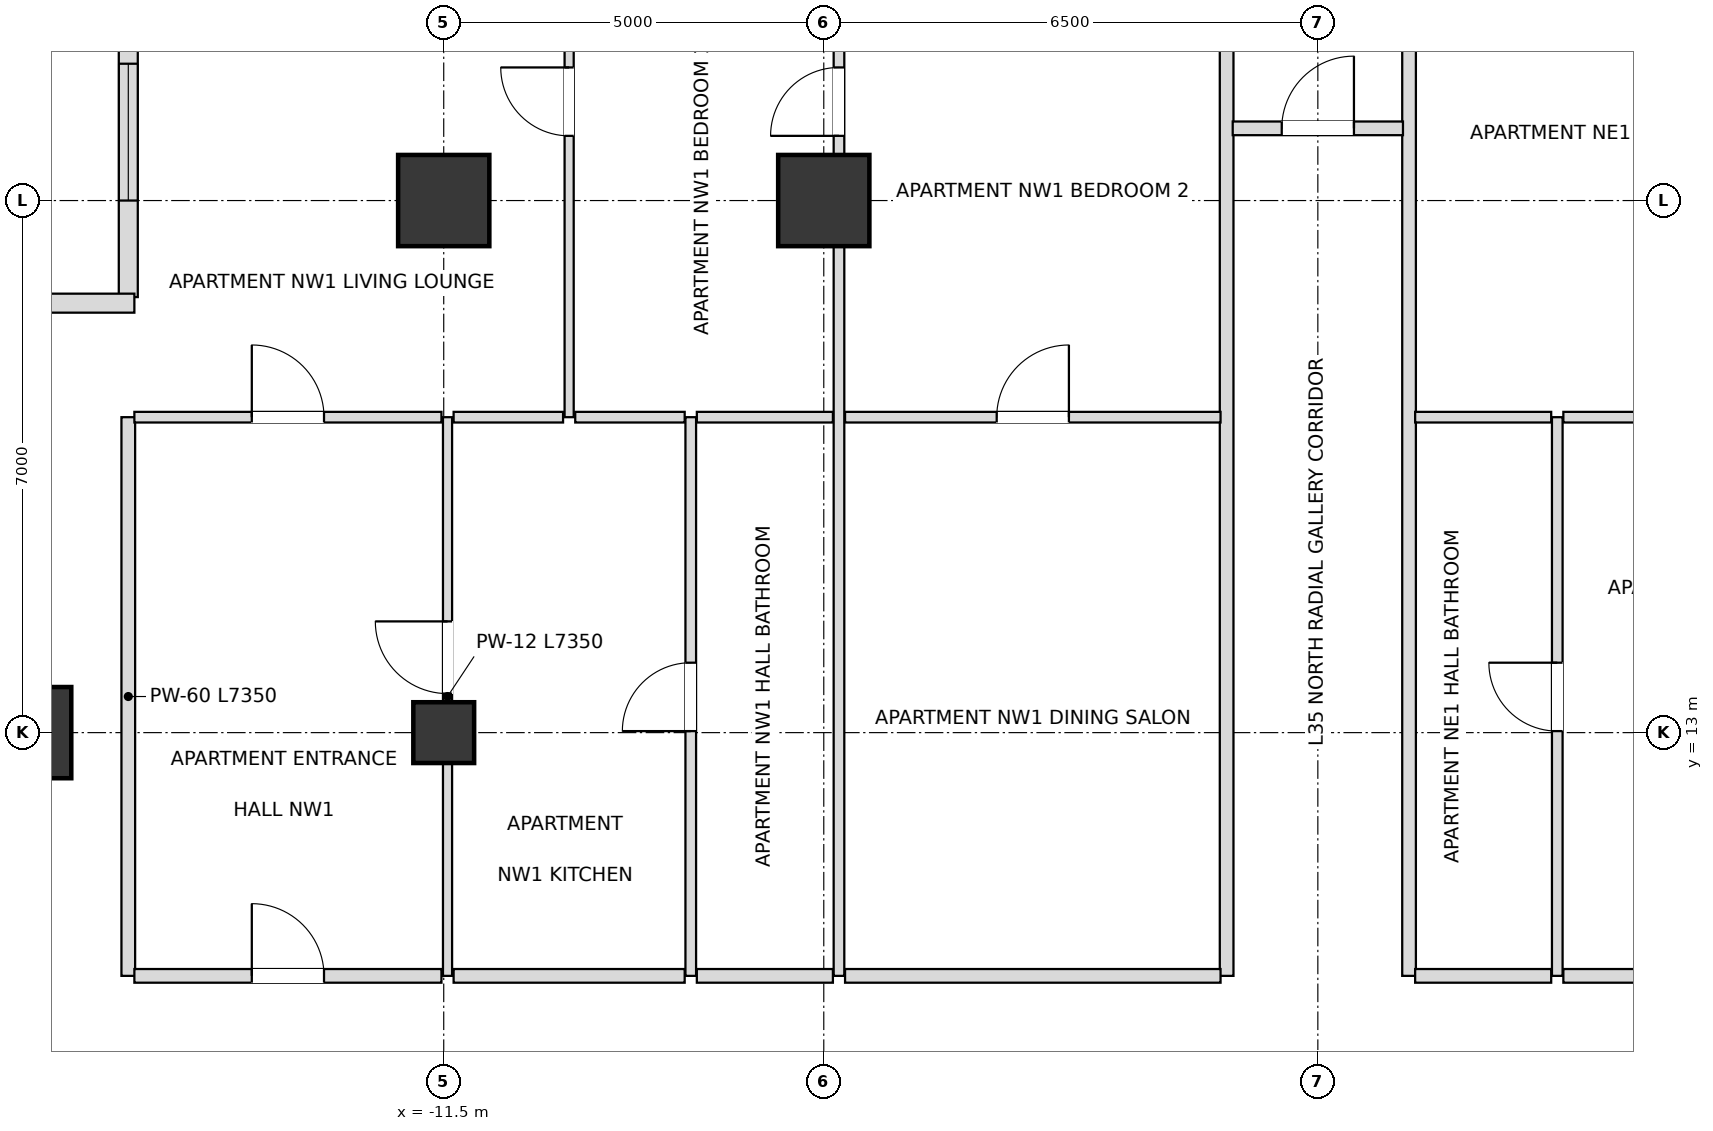
"""IFC4 building model, lengths in metres.
Left out: names, types, materials, properties, quantities, classifications, styles, units other than length and angle.
Written with IfcOpenShell. Run it as: python <this file> out.ifc"""

import sys

from ifc_helpers import new_model, si_unit, direction, frame, frame_2d, origin, origin_2d, place, context, subcontext, project, spatial, rectangle, extrude, element, fill, save


model = new_model("IFC4")
c1 = context("Model", 3, precision=1e-05, world=origin(), true_north=direction((0.0, 1.0)))
c2 = subcontext(c1, "Body", "Model", "MODEL_VIEW")
j1 = project(units=[si_unit("LENGTHUNIT", "METRE"), si_unit("PLANEANGLEUNIT", "RADIAN")], contexts=[c1])
p1 = place(None, origin())
s1 = spatial("IfcSite", under=j1, at=p1, CompositionType="ELEMENT")
p2 = place(p1, origin())
s2 = spatial("IfcBuilding", under=s1, at=p2, CompositionType="ELEMENT")
p3 = place(p2, frame((0.0, 0.0, 140.4)))
s3 = spatial("IfcBuildingStorey", under=s2, at=p3, CompositionType="ELEMENT", Elevation=140.4)
for number, where, z_axis, x_axis in (
    (1, (-6.5, 20.0, 0.0), (0.0, 0.0, 1.0), (1.0, 0.0, 0.0)),
    (2, (-11.5, 20.0, 0.0), (0.0, 0.0, 1.0), (1.0, 0.0, 0.0)),
    (3, (-17.0, 13.0, 0.0), (0.0, 0.0, 1.0), (1.0, 0.0, 0.0)),
):
    element("IfcColumn", number, at=place(p3, frame(where, z_axis=z_axis, x_axis=x_axis)), inside=s3, PredefinedType="USERDEFINED", context=c2, shape_type="SweptSolid", body=[
        extrude(rectangle(XDim=1.2, YDim=1.2, at=origin_2d()), origin(), (0.0, 0.0, 1.0), 3.6),
    ])
p4 = place(p3, frame((-11.5, 13.0, 0.0), z_axis=(0.0, 0.0, 1.0), x_axis=(1.0, 0.0, 0.0)))
e4 = element("IfcColumn", 4, at=p4, inside=s3, PredefinedType="COLUMN", context=c2, shape_type="SweptSolid", body=[
    extrude(rectangle(XDim=0.8, YDim=0.8, at=origin_2d()), origin(), (0.0, 0.0, 1.0), 3.6),
])
p5 = place(p3, frame((-15.65, 23.07, 0.0), z_axis=(0.0, 0.0, 1.0), x_axis=(0.0, -1.0, 0.0)))
e5 = element("IfcWall", 5, at=p5, inside=s3, PredefinedType="SOLIDWALL", context=c2, shape_type="SweptSolid", body=[
    extrude(rectangle(XDim=4.34, YDim=0.25, at=frame_2d((2.17, 0.0))), origin(), (0.0, 0.0, 1.0), 2.736),
])
p6 = place(p5, frame((1.27, 0.0, 0.72)))
e6 = element("IfcOpeningElement", 6, at=p6, cuts=e5, PredefinedType="OPENING", context=c2, shape_type="SweptSolid", body=[
    extrude(rectangle(XDim=1.8, YDim=1.68, at=frame_2d((0.9, 0.84))), frame((0.0, 0.135, 0.0), z_axis=(0.0, -1.0, 0.0), x_axis=(1.0, 0.0, 0.0)), (0.0, 0.0, 1.0), 0.27),
])
p7 = place(p3, frame((-15.57, 18.65, 0.0), z_axis=(0.0, 0.0, 1.0), x_axis=(-1.0, 0.0, 0.0)))
e7 = element("IfcWall", 7, at=p7, inside=s3, PredefinedType="SOLIDWALL", context=c2, shape_type="SweptSolid", body=[
    extrude(rectangle(XDim=4.66, YDim=0.25, at=frame_2d((2.33, 0.0))), origin(), (0.0, 0.0, 1.0), 2.736),
])
p8 = place(p7, frame((1.43, 0.0, 0.72)))
e8 = element("IfcOpeningElement", 8, at=p8, cuts=e7, PredefinedType="OPENING", context=c2, shape_type="SweptSolid", body=[
    extrude(rectangle(XDim=1.8, YDim=1.68, at=frame_2d((0.9, 0.84))), frame((0.0, 0.135, 0.0), z_axis=(0.0, -1.0, 0.0), x_axis=(1.0, 0.0, 0.0)), (0.0, 0.0, 1.0), 0.27),
])
p9 = place(p3, frame((-15.65, 9.8, 0.0), z_axis=(0.0, 0.0, 1.0), x_axis=(0.0, 1.0, 0.0)))
e9 = element("IfcWall", 9, at=p9, inside=s3, PredefinedType="PARTITIONING", context=c2, shape_type="SweptSolid", body=[
    extrude(rectangle(XDim=7.35, YDim=0.18, at=frame_2d((3.675, 0.0))), origin(), (0.0, 0.0, 1.0), 2.736),
])
p10 = place(p3, frame((-11.45, 9.8, 0.0), z_axis=(0.0, 0.0, 1.0), x_axis=(0.0, 1.0, 0.0)))
e10 = element("IfcWall", 10, at=p10, inside=s3, PredefinedType="PARTITIONING", context=c2, shape_type="SweptSolid", body=[
    extrude(rectangle(XDim=7.35, YDim=0.12, at=frame_2d((3.675, 0.0))), origin(), (0.0, 0.0, 1.0), 2.736),
])
p11 = place(p10, frame((3.713, 0.0, 0.0)))
e11 = element("IfcOpeningElement", 11, at=p11, cuts=e10, PredefinedType="OPENING", context=c2, shape_type="SweptSolid", body=[
    extrude(rectangle(XDim=0.95, YDim=2.1, at=frame_2d((0.475, 1.05))), frame((0.0, 0.07, 0.0), z_axis=(0.0, -1.0, 0.0), x_axis=(1.0, 0.0, 0.0)), (0.0, 0.0, 1.0), 0.14),
])
p12 = place(p3, frame((-9.85, 17.15, 0.0), z_axis=(0.0, 0.0, 1.0), x_axis=(0.0, 1.0, 0.0)))
e12 = element("IfcWall", 12, at=p12, inside=s3, PredefinedType="PARTITIONING", context=c2, shape_type="SweptSolid", body=[
    extrude(rectangle(XDim=6.0, YDim=0.12, at=frame_2d((3.0, 0.0))), origin(), (0.0, 0.0, 1.0), 2.816),
])
p13 = place(p12, frame((3.701, 0.0, 0.0)))
e13 = element("IfcOpeningElement", 13, at=p13, cuts=e12, PredefinedType="OPENING", context=c2, shape_type="SweptSolid", body=[
    extrude(rectangle(XDim=0.9, YDim=2.1, at=frame_2d((0.45, 1.05))), frame((0.0, 0.07, 0.0), z_axis=(0.0, -1.0, 0.0), x_axis=(1.0, 0.0, 0.0)), (0.0, 0.0, 1.0), 0.14),
])
p14 = place(p3, frame((-8.25, 9.8, 0.0), z_axis=(0.0, 0.0, 1.0), x_axis=(0.0, 1.0, 0.0)))
e14 = element("IfcWall", 14, at=p14, inside=s3, PredefinedType="PARTITIONING", context=c2, shape_type="SweptSolid", body=[
    extrude(rectangle(XDim=7.35, YDim=0.14, at=frame_2d((3.675, 0.0))), origin(), (0.0, 0.0, 1.0), 2.816),
])
p15 = place(p14, frame((3.22, 0.0, 0.0)))
e15 = element("IfcOpeningElement", 15, at=p15, cuts=e14, PredefinedType="OPENING", context=c2, shape_type="SweptSolid", body=[
    extrude(rectangle(XDim=0.9, YDim=2.1, at=frame_2d((0.45, 1.05))), frame((0.0, 0.08, 0.0), z_axis=(0.0, -1.0, 0.0), x_axis=(1.0, 0.0, 0.0)), (0.0, 0.0, 1.0), 0.16),
])
p16 = place(p3, frame((-6.3, 9.8, 0.0), z_axis=(0.0, 0.0, 1.0), x_axis=(0.0, 1.0, 0.0)))
e16 = element("IfcWall", 16, at=p16, inside=s3, PredefinedType="PARTITIONING", context=c2, shape_type="SweptSolid", body=[
    extrude(rectangle(XDim=13.35, YDim=0.14, at=frame_2d((6.675, 0.0))), origin(), (0.0, 0.0, 1.0), 2.816),
])
p17 = place(p16, frame((11.051, 0.0, 0.0)))
e17 = element("IfcOpeningElement", 17, at=p17, cuts=e16, PredefinedType="OPENING", context=c2, shape_type="SweptSolid", body=[
    extrude(rectangle(XDim=0.9, YDim=2.1, at=frame_2d((0.45, 1.05))), frame((0.0, 0.08, 0.0), z_axis=(0.0, -1.0, 0.0), x_axis=(1.0, 0.0, 0.0)), (0.0, 0.0, 1.0), 0.16),
])
for number, where, z_axis, x_axis in (
    (18, (-1.2, 9.8, 0.0), (0.0, 0.0, 1.0), (0.0, 1.0, 0.0)),
    (19, (1.2, 9.8, 0.0), (0.0, 0.0, 1.0), (0.0, 1.0, 0.0)),
):
    element("IfcWall", number, at=place(p3, frame(where, z_axis=z_axis, x_axis=x_axis)), inside=s3, PredefinedType="PARTITIONING", context=c2, shape_type="SweptSolid", body=[
        extrude(rectangle(XDim=13.35, YDim=0.18, at=frame_2d((6.675, 0.0))), origin(), (0.0, 0.0, 1.0), 2.816),
    ])
p18 = place(p3, frame((3.15, 9.8, 0.0), z_axis=(0.0, 0.0, 1.0), x_axis=(0.0, 1.0, 0.0)))
e20 = element("IfcWall", 20, at=p18, inside=s3, PredefinedType="PARTITIONING", context=c2, shape_type="SweptSolid", body=[
    extrude(rectangle(XDim=7.35, YDim=0.14, at=frame_2d((3.675, 0.0))), origin(), (0.0, 0.0, 1.0), 3.38),
])
p19 = place(p18, frame((3.22, 0.0, 0.0)))
e21 = element("IfcOpeningElement", 21, at=p19, cuts=e20, PredefinedType="OPENING", context=c2, shape_type="SweptSolid", body=[
    extrude(rectangle(XDim=0.9, YDim=2.1, at=frame_2d((0.45, 1.05))), frame((0.0, 0.08, 0.0), z_axis=(0.0, -1.0, 0.0), x_axis=(1.0, 0.0, 0.0)), (0.0, 0.0, 1.0), 0.16),
])
p20 = place(p3, frame((-15.57, 9.8, 0.0), z_axis=(0.0, 0.0, 1.0), x_axis=(1.0, 0.0, 0.0)))
e22 = element("IfcWall", 22, at=p20, inside=s3, PredefinedType="PARTITIONING", context=c2, shape_type="SweptSolid", body=[
    extrude(rectangle(XDim=4.04, YDim=0.18, at=frame_2d((2.02, 0.0))), origin(), (0.0, 0.0, 1.0), 3.38),
])
p21 = place(p20, frame((1.545, 0.0, 0.0)))
e23 = element("IfcOpeningElement", 23, at=p21, cuts=e22, PredefinedType="OPENING", context=c2, shape_type="SweptSolid", body=[
    extrude(rectangle(XDim=0.95, YDim=2.15, at=frame_2d((0.475, 1.075))), frame((0.0, 0.1, 0.0), z_axis=(0.0, -1.0, 0.0), x_axis=(1.0, 0.0, 0.0)), (0.0, 0.0, 1.0), 0.2),
])
p22 = place(p3, frame((-11.37, 9.8, 0.0), z_axis=(0.0, 0.0, 1.0), x_axis=(1.0, 0.0, 0.0)))
e24 = element("IfcWall", 24, at=p22, inside=s3, PredefinedType="PARTITIONING", context=c2, shape_type="SweptSolid", body=[
    extrude(rectangle(XDim=3.04, YDim=0.18, at=frame_2d((1.52, 0.0))), origin(), (0.0, 0.0, 1.0), 3.38),
])
p23 = place(p3, frame((-8.17, 9.8, 0.0), z_axis=(0.0, 0.0, 1.0), x_axis=(1.0, 0.0, 0.0)))
e25 = element("IfcWall", 25, at=p23, inside=s3, PredefinedType="PARTITIONING", context=c2, shape_type="SweptSolid", body=[
    extrude(rectangle(XDim=1.79, YDim=0.18, at=frame_2d((0.895, 0.0))), origin(), (0.0, 0.0, 1.0), 2.816),
])
p24 = place(p3, frame((-6.22, 9.8, 0.0), z_axis=(0.0, 0.0, 1.0), x_axis=(1.0, 0.0, 0.0)))
e26 = element("IfcWall", 26, at=p24, inside=s3, PredefinedType="PARTITIONING", context=c2, shape_type="SweptSolid", body=[
    extrude(rectangle(XDim=4.94, YDim=0.18, at=frame_2d((2.47, 0.0))), origin(), (0.0, 0.0, 1.0), 3.38),
])
p25 = place(p3, frame((1.28, 9.8, 0.0), z_axis=(0.0, 0.0, 1.0), x_axis=(1.0, 0.0, 0.0)))
e27 = element("IfcWall", 27, at=p25, inside=s3, PredefinedType="PARTITIONING", context=c2, shape_type="SweptSolid", body=[
    extrude(rectangle(XDim=1.79, YDim=0.18, at=frame_2d((0.895, 0.0))), origin(), (0.0, 0.0, 1.0), 3.38),
])
p26 = place(p3, frame((3.23, 9.8, 0.0), z_axis=(0.0, 0.0, 1.0), x_axis=(1.0, 0.0, 0.0)))
e28 = element("IfcWall", 28, at=p26, inside=s3, PredefinedType="PARTITIONING", context=c2, shape_type="SweptSolid", body=[
    extrude(rectangle(XDim=4.04, YDim=0.18, at=frame_2d((2.02, 0.0))), origin(), (0.0, 0.0, 1.0), 2.816),
])
p27 = place(p26, frame((1.545, 0.0, 0.0)))
e29 = element("IfcOpeningElement", 29, at=p27, cuts=e28, PredefinedType="OPENING", context=c2, shape_type="SweptSolid", body=[
    extrude(rectangle(XDim=0.95, YDim=2.15, at=frame_2d((0.475, 1.075))), frame((0.0, 0.1, 0.0), z_axis=(0.0, -1.0, 0.0), x_axis=(1.0, 0.0, 0.0)), (0.0, 0.0, 1.0), 0.2),
])
p28 = place(p3, frame((-15.57, 17.15, 0.0), z_axis=(0.0, 0.0, 1.0), x_axis=(1.0, 0.0, 0.0)))
e30 = element("IfcWall", 30, at=p28, inside=s3, PredefinedType="PARTITIONING", context=c2, shape_type="SweptSolid", body=[
    extrude(rectangle(XDim=4.04, YDim=0.14, at=frame_2d((2.02, 0.0))), origin(), (0.0, 0.0, 1.0), 2.736),
])
p29 = place(p28, frame((1.545, 0.0, 0.0)))
e31 = element("IfcOpeningElement", 31, at=p29, cuts=e30, PredefinedType="OPENING", context=c2, shape_type="SweptSolid", body=[
    extrude(rectangle(XDim=0.95, YDim=2.1, at=frame_2d((0.475, 1.05))), frame((0.0, 0.08, 0.0), z_axis=(0.0, -1.0, 0.0), x_axis=(1.0, 0.0, 0.0)), (0.0, 0.0, 1.0), 0.16),
])
p30 = place(p3, frame((-11.37, 17.15, 0.0), z_axis=(0.0, 0.0, 1.0), x_axis=(1.0, 0.0, 0.0)))
e32 = element("IfcWall", 32, at=p30, inside=s3, PredefinedType="PARTITIONING", context=c2, shape_type="SweptSolid", body=[
    extrude(rectangle(XDim=1.44, YDim=0.14, at=frame_2d((0.72, 0.0))), origin(), (0.0, 0.0, 1.0), 3.38),
])
p31 = place(p3, frame((-9.77, 17.15, 0.0), z_axis=(0.0, 0.0, 1.0), x_axis=(1.0, 0.0, 0.0)))
e33 = element("IfcWall", 33, at=p31, inside=s3, PredefinedType="PARTITIONING", context=c2, shape_type="SweptSolid", body=[
    extrude(rectangle(XDim=1.44, YDim=0.14, at=frame_2d((0.72, 0.0))), origin(), (0.0, 0.0, 1.0), 3.38),
])
p32 = place(p3, frame((-8.17, 17.15, 0.0), z_axis=(0.0, 0.0, 1.0), x_axis=(1.0, 0.0, 0.0)))
e34 = element("IfcWall", 34, at=p32, inside=s3, PredefinedType="PARTITIONING", context=c2, shape_type="SweptSolid", body=[
    extrude(rectangle(XDim=1.79, YDim=0.14, at=frame_2d((0.895, 0.0))), origin(), (0.0, 0.0, 1.0), 2.816),
])
p33 = place(p3, frame((-6.22, 17.15, 0.0), z_axis=(0.0, 0.0, 1.0), x_axis=(1.0, 0.0, 0.0)))
e35 = element("IfcWall", 35, at=p33, inside=s3, PredefinedType="PARTITIONING", context=c2, shape_type="SweptSolid", body=[
    extrude(rectangle(XDim=4.94, YDim=0.14, at=frame_2d((2.47, 0.0))), origin(), (0.0, 0.0, 1.0), 3.38),
])
p34 = place(p33, frame((1.995, 0.0, 0.0)))
e36 = element("IfcOpeningElement", 36, at=p34, cuts=e35, PredefinedType="OPENING", context=c2, shape_type="SweptSolid", body=[
    extrude(rectangle(XDim=0.95, YDim=2.1, at=frame_2d((0.475, 1.05))), frame((0.0, 0.08, 0.0), z_axis=(0.0, -1.0, 0.0), x_axis=(1.0, 0.0, 0.0)), (0.0, 0.0, 1.0), 0.16),
])
p35 = place(p3, frame((1.28, 17.15, 0.0), z_axis=(0.0, 0.0, 1.0), x_axis=(1.0, 0.0, 0.0)))
e37 = element("IfcWall", 37, at=p35, inside=s3, PredefinedType="PARTITIONING", context=c2, shape_type="SweptSolid", body=[
    extrude(rectangle(XDim=1.79, YDim=0.14, at=frame_2d((0.895, 0.0))), origin(), (0.0, 0.0, 1.0), 3.38),
])
p36 = place(p3, frame((3.23, 17.15, 0.0), z_axis=(0.0, 0.0, 1.0), x_axis=(1.0, 0.0, 0.0)))
e38 = element("IfcWall", 38, at=p36, inside=s3, PredefinedType="PARTITIONING", context=c2, shape_type="SweptSolid", body=[
    extrude(rectangle(XDim=4.04, YDim=0.14, at=frame_2d((2.02, 0.0))), origin(), (0.0, 0.0, 1.0), 2.816),
])
p37 = place(p36, frame((1.545, 0.0, 0.0)))
e39 = element("IfcOpeningElement", 39, at=p37, cuts=e38, PredefinedType="OPENING", context=c2, shape_type="SweptSolid", body=[
    extrude(rectangle(XDim=0.95, YDim=2.1, at=frame_2d((0.475, 1.05))), frame((0.0, 0.08, 0.0), z_axis=(0.0, -1.0, 0.0), x_axis=(1.0, 0.0, 0.0)), (0.0, 0.0, 1.0), 0.16),
])
p38 = place(p3, frame((-1.12, 20.95, 0.0), z_axis=(0.0, 0.0, 1.0), x_axis=(1.0, 0.0, 0.0)))
e40 = element("IfcWall", 40, at=p38, inside=s3, PredefinedType="PARTITIONING", context=c2, shape_type="SweptSolid", body=[
    extrude(rectangle(XDim=2.24, YDim=0.18, at=frame_2d((1.12, 0.0))), origin(), (0.0, 0.0, 1.0), 3.38),
])
p39 = place(p38, frame((0.645, 0.0, 0.0)))
e41 = element("IfcOpeningElement", 41, at=p39, cuts=e40, PredefinedType="OPENING", context=c2, shape_type="SweptSolid", body=[
    extrude(rectangle(XDim=0.95, YDim=2.15, at=frame_2d((0.475, 1.075))), frame((0.0, 0.1, 0.0), z_axis=(0.0, -1.0, 0.0), x_axis=(1.0, 0.0, 0.0)), (0.0, 0.0, 1.0), 0.2),
])
p40 = place(p6, origin())
e42 = element("IfcWindow", 42, at=p40, inside=s3, PartitioningType="SINGLE_PANEL", PredefinedType="WINDOW", context=c2, shape_type="SweptSolid", body=[
    extrude(rectangle(XDim=1.8, YDim=1.68, at=frame_2d((0.9, 0.84))), frame((0.0, 0.03, 0.0), z_axis=(0.0, -1.0, 0.0), x_axis=(1.0, 0.0, 0.0)), (0.0, 0.0, 1.0), 0.06),
])
fill(e6, e42)
p41 = place(p39, origin())
e43 = element("IfcDoor", 43, at=p41, inside=s3, OperationType="SINGLE_SWING_RIGHT", PredefinedType="DOOR", context=c2, shape_type="SweptSolid", body=[
    extrude(rectangle(XDim=0.95, YDim=2.15, at=frame_2d((0.475, 1.075))), frame((0.0, 0.025, 0.0), z_axis=(0.0, -1.0, 0.0), x_axis=(1.0, 0.0, 0.0)), (0.0, 0.0, 1.0), 0.05),
])
fill(e41, e43)
p42 = place(p21, origin())
e44 = element("IfcDoor", 44, at=p42, inside=s3, OperationType="SINGLE_SWING_LEFT", PredefinedType="DOOR", context=c2, shape_type="SweptSolid", body=[
    extrude(rectangle(XDim=0.95, YDim=2.15, at=frame_2d((0.475, 1.075))), frame((0.0, 0.025, 0.0), z_axis=(0.0, -1.0, 0.0), x_axis=(1.0, 0.0, 0.0)), (0.0, 0.0, 1.0), 0.05),
])
fill(e23, e44)
p43 = place(p11, origin())
e45 = element("IfcDoor", 45, at=p43, inside=s3, OperationType="SINGLE_SWING_RIGHT", PredefinedType="DOOR", context=c2, shape_type="SweptSolid", body=[
    extrude(rectangle(XDim=0.95, YDim=2.1, at=frame_2d((0.475, 1.05))), frame((0.0, 0.025, 0.0), z_axis=(0.0, -1.0, 0.0), x_axis=(1.0, 0.0, 0.0)), (0.0, 0.0, 1.0), 0.05),
])
fill(e11, e45)
p44 = place(p15, origin())
e46 = element("IfcDoor", 46, at=p44, inside=s3, OperationType="SINGLE_SWING_LEFT", PredefinedType="DOOR", context=c2, shape_type="SweptSolid", body=[
    extrude(rectangle(XDim=0.9, YDim=2.1, at=frame_2d((0.45, 1.05))), frame((0.0, 0.025, 0.0), z_axis=(0.0, -1.0, 0.0), x_axis=(1.0, 0.0, 0.0)), (0.0, 0.0, 1.0), 0.05),
])
fill(e15, e46)
p45 = place(p34, origin())
e47 = element("IfcDoor", 47, at=p45, inside=s3, OperationType="SINGLE_SWING_RIGHT", PredefinedType="DOOR", context=c2, shape_type="SweptSolid", body=[
    extrude(rectangle(XDim=0.95, YDim=2.1, at=frame_2d((0.475, 1.05))), frame((0.0, 0.025, 0.0), z_axis=(0.0, -1.0, 0.0), x_axis=(1.0, 0.0, 0.0)), (0.0, 0.0, 1.0), 0.05),
])
fill(e36, e47)
p46 = place(p29, origin())
e48 = element("IfcDoor", 48, at=p46, inside=s3, OperationType="SINGLE_SWING_LEFT", PredefinedType="DOOR", context=c2, shape_type="SweptSolid", body=[
    extrude(rectangle(XDim=0.95, YDim=2.1, at=frame_2d((0.475, 1.05))), frame((0.0, 0.025, 0.0), z_axis=(0.0, -1.0, 0.0), x_axis=(1.0, 0.0, 0.0)), (0.0, 0.0, 1.0), 0.05),
])
fill(e31, e48)
p47 = place(p13, origin())
e49 = element("IfcDoor", 49, at=p47, inside=s3, OperationType="SINGLE_SWING_RIGHT", PredefinedType="DOOR", context=c2, shape_type="SweptSolid", body=[
    extrude(rectangle(XDim=0.9, YDim=2.1, at=frame_2d((0.45, 1.05))), frame((0.0, 0.025, 0.0), z_axis=(0.0, -1.0, 0.0), x_axis=(1.0, 0.0, 0.0)), (0.0, 0.0, 1.0), 0.05),
])
fill(e13, e49)
p48 = place(p17, origin())
e50 = element("IfcDoor", 50, at=p48, inside=s3, OperationType="SINGLE_SWING_LEFT", PredefinedType="DOOR", context=c2, shape_type="SweptSolid", body=[
    extrude(rectangle(XDim=0.9, YDim=2.1, at=frame_2d((0.45, 1.05))), frame((0.0, 0.025, 0.0), z_axis=(0.0, -1.0, 0.0), x_axis=(1.0, 0.0, 0.0)), (0.0, 0.0, 1.0), 0.05),
])
fill(e17, e50)
p49 = place(p19, origin())
e51 = element("IfcDoor", 51, at=p49, inside=s3, OperationType="SINGLE_SWING_RIGHT", PredefinedType="DOOR", context=c2, shape_type="SweptSolid", body=[
    extrude(rectangle(XDim=0.9, YDim=2.1, at=frame_2d((0.45, 1.05))), frame((0.0, 0.025, 0.0), z_axis=(0.0, -1.0, 0.0), x_axis=(1.0, 0.0, 0.0)), (0.0, 0.0, 1.0), 0.05),
])
fill(e21, e51)
save(model, sys.argv[1])
